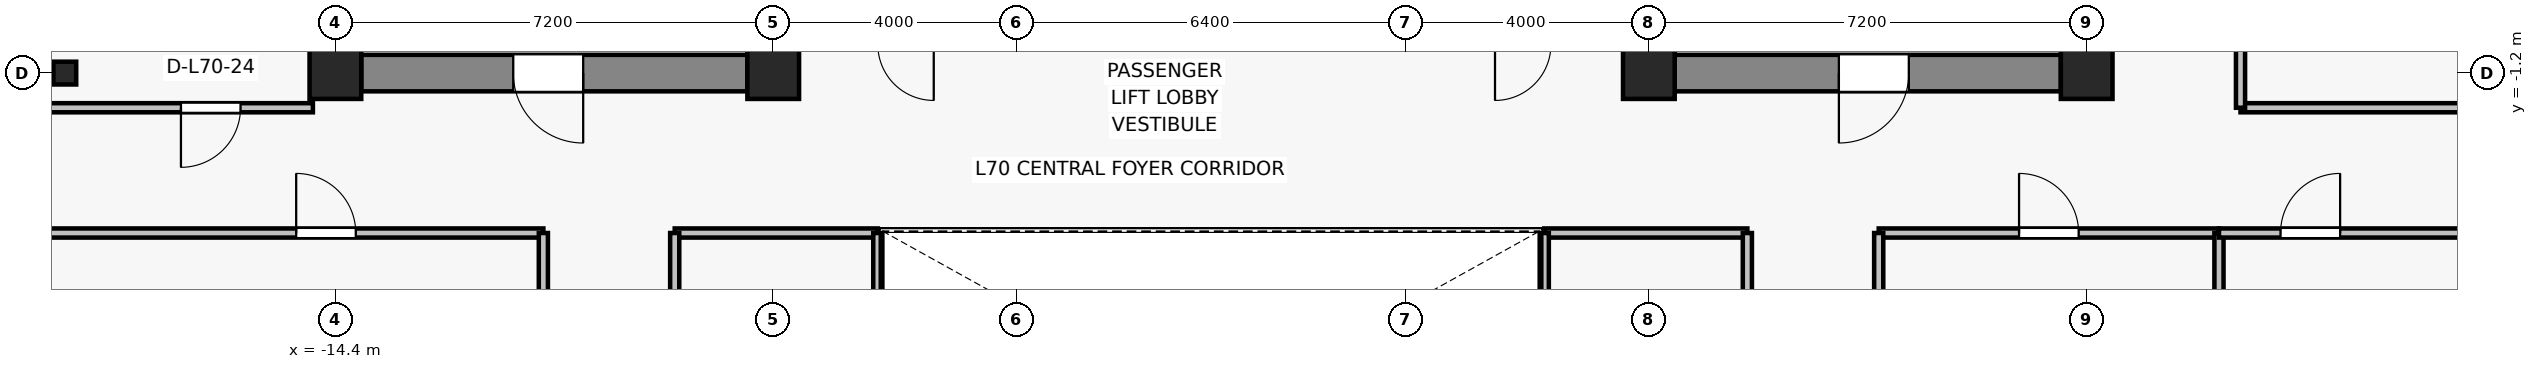
"""IFC4 building model, lengths in metres.
Left out: names, types, materials, properties, quantities, classifications, styles, units other than length and angle.
Written with IfcOpenShell. Run it as: python <this file> out.ifc"""

import sys

from ifc_helpers import new_model, si_unit, direction, frame, frame_2d, origin, origin_2d, place, context, subcontext, project, spatial, rectangle, i_section, extrude, source, transform, mapped, element, fill, save


model = new_model("IFC4")
c1 = context("Model", 3, precision=1e-05, world=origin(), true_north=direction((0.0, 1.0)))
c2 = subcontext(c1, "Body", "Model", "MODEL_VIEW")
j1 = project(units=[si_unit("LENGTHUNIT", "METRE"), si_unit("PLANEANGLEUNIT", "RADIAN")], contexts=[c1])
p1 = place(None, origin())
s1 = spatial("IfcSite", under=j1, at=p1, CompositionType="ELEMENT")
p2 = place(p1, origin())
s2 = spatial("IfcBuilding", under=s1, at=p2, CompositionType="ELEMENT")
p3 = place(p2, frame((0.0, 0.0, 248.5)))
s3 = spatial("IfcBuildingStorey", under=s2, at=p3, CompositionType="ELEMENT", Elevation=248.5)
for number, where, z_axis, x_axis in (
    (1, (-14.4, -1.2, 0.0), (0.0, 0.0, 1.0), (1.0, 0.0, 0.0)),
    (2, (-7.2, -1.2, 0.0), (0.0, 0.0, 1.0), (1.0, 0.0, 0.0)),
    (3, (7.2, -1.2, 0.0), (0.0, 0.0, 1.0), (1.0, 0.0, 0.0)),
    (4, (14.4, -1.2, 0.0), (0.0, 0.0, 1.0), (1.0, 0.0, 0.0)),
):
    element("IfcColumn", number, at=place(p3, frame(where, z_axis=z_axis, x_axis=x_axis)), inside=s3, PredefinedType="COLUMN", context=c2, shape_type="SweptSolid", body=[
        extrude(rectangle(XDim=0.85, YDim=0.85, at=origin_2d()), origin(), (0.0, 0.0, 1.0), 3.3),
    ])
p4 = place(p3, frame((-18.85, -1.2, 0.0), z_axis=(0.0, 0.0, 1.0), x_axis=(1.0, 0.0, 0.0)))
e5 = element("IfcColumn", 5, at=p4, inside=s3, PredefinedType="COLUMN", context=c2, shape_type="SweptSolid", body=[
    extrude(i_section(OverallWidth=0.375, OverallDepth=0.375, WebThickness=0.017, FlangeThickness=0.027, FilletRadius=0.015, at=origin_2d()), origin(), (0.0, 0.0, 1.0), 3.3),
])
p5 = place(p3, frame((-7.625, -1.2, 0.0), z_axis=(0.0, 0.0, 1.0), x_axis=(-1.0, 0.0, 0.0)))
e6 = element("IfcWall", 6, at=p5, inside=s3, PredefinedType="SHEAR", context=c2, shape_type="SweptSolid", body=[
    extrude(rectangle(XDim=6.35, YDim=0.6, at=frame_2d((3.175, 0.0))), origin(), (0.0, 0.0, 1.0), 3.075),
])
p6 = place(p5, frame((2.7, 0.0, 0.0)))
e7 = element("IfcOpeningElement", 7, at=p6, cuts=e6, PredefinedType="OPENING", context=c2, shape_type="SweptSolid", body=[
    extrude(rectangle(XDim=1.15, YDim=2.15, at=frame_2d((0.575, 1.075))), frame((0.0, 0.31, 0.0), z_axis=(0.0, -1.0, 0.0), x_axis=(1.0, 0.0, 0.0)), (0.0, 0.0, 1.0), 0.62),
])
p7 = place(p3, frame((13.975, -1.2, 0.0), z_axis=(0.0, 0.0, 1.0), x_axis=(-1.0, 0.0, 0.0)))
e8 = element("IfcWall", 8, at=p7, inside=s3, PredefinedType="SHEAR", context=c2, shape_type="SweptSolid", body=[
    extrude(rectangle(XDim=6.35, YDim=0.6, at=frame_2d((3.175, 0.0))), origin(), (0.0, 0.0, 1.0), 3.075),
])
p8 = place(p7, frame((2.5, 0.0, 0.0)))
e9 = element("IfcOpeningElement", 9, at=p8, cuts=e8, PredefinedType="OPENING", context=c2, shape_type="SweptSolid", body=[
    extrude(rectangle(XDim=1.15, YDim=2.15, at=frame_2d((0.575, 1.075))), frame((0.0, 0.31, 0.0), z_axis=(0.0, -1.0, 0.0), x_axis=(1.0, 0.0, 0.0)), (0.0, 0.0, 1.0), 0.62),
])
for number, where, z_axis, x_axis in (
    (10, (-7.4, -0.9, 0.0), (0.0, 0.0, 1.0), (0.0, 1.0, 0.0)),
    (11, (7.4, -0.9, 0.0), (0.0, 0.0, 1.0), (0.0, 1.0, 0.0)),
):
    element("IfcWall", number, at=place(p3, frame(where, z_axis=z_axis, x_axis=x_axis)), inside=s3, PredefinedType="SHEAR", context=c2, shape_type="SweptSolid", body=[
        extrude(rectangle(XDim=4.15, YDim=0.45, at=frame_2d((2.075, 0.0))), origin(), (0.0, 0.0, 1.0), 3.075),
    ])
p9 = place(p3, frame((-19.53, -3.83, 0.0), z_axis=(0.0, 0.0, 1.0), x_axis=(1.0, 0.0, 0.0)))
e12 = element("IfcWall", 12, at=p9, inside=s3, PredefinedType="PARTITIONING", context=c2, shape_type="SweptSolid", body=[
    extrude(rectangle(XDim=8.55, YDim=0.15, at=frame_2d((4.275, 0.0))), origin(), (0.0, 0.0, 1.0), 2.615),
])
p10 = place(p9, frame((4.485, 0.0, 0.0)))
e13 = element("IfcOpeningElement", 13, at=p10, cuts=e12, PredefinedType="OPENING", context=c2, shape_type="SweptSolid", body=[
    extrude(rectangle(XDim=0.98, YDim=2.15, at=frame_2d((0.49, 1.075))), frame((0.0, 0.085, 0.0), z_axis=(0.0, -1.0, 0.0), x_axis=(1.0, 0.0, 0.0)), (0.0, 0.0, 1.0), 0.17),
])
p11 = place(p3, frame((-10.98, -3.83, 0.0), z_axis=(0.0, 0.0, 1.0), x_axis=(0.0, -1.0, 0.0)))
e14 = element("IfcWall", 14, at=p11, inside=s3, PredefinedType="PARTITIONING", context=c2, shape_type="SweptSolid", body=[
    extrude(rectangle(XDim=5.69, YDim=0.15, at=frame_2d((2.845, 0.0))), origin(), (0.0, 0.0, 1.0), 2.615),
])
p12 = place(p3, frame((10.98, -3.83, 0.0), z_axis=(0.0, 0.0, 1.0), x_axis=(1.0, 0.0, 0.0)))
e15 = element("IfcWall", 15, at=p12, inside=s3, PredefinedType="PARTITIONING", context=c2, shape_type="SweptSolid", body=[
    extrude(rectangle(XDim=5.596, YDim=0.15, at=frame_2d((2.798, 0.0))), origin(), (0.0, 0.0, 1.0), 2.615),
])
p13 = place(p12, frame((2.308, 0.0, 0.0)))
e16 = element("IfcOpeningElement", 16, at=p13, cuts=e15, PredefinedType="OPENING", context=c2, shape_type="SweptSolid", body=[
    extrude(rectangle(XDim=0.98, YDim=2.15, at=frame_2d((0.49, 1.075))), frame((0.0, 0.085, 0.0), z_axis=(0.0, -1.0, 0.0), x_axis=(1.0, 0.0, 0.0)), (0.0, 0.0, 1.0), 0.17),
])
for number, where, z_axis, x_axis in (
    (17, (10.98, -9.52, 0.0), (0.0, 0.0, 1.0), (0.0, 1.0, 0.0)),
    (18, (16.576, -3.83, 0.0), (0.0, 0.0, 1.0), (0.0, -1.0, 0.0)),
):
    element("IfcWall", number, at=place(p3, frame(where, z_axis=z_axis, x_axis=x_axis)), inside=s3, PredefinedType="PARTITIONING", context=c2, shape_type="SweptSolid", body=[
        extrude(rectangle(XDim=5.69, YDim=0.15, at=frame_2d((2.845, 0.0))), origin(), (0.0, 0.0, 1.0), 2.615),
    ])
p14 = place(p3, frame((16.576, -3.83, 0.0), z_axis=(0.0, 0.0, 1.0), x_axis=(1.0, 0.0, 0.0)))
e19 = element("IfcWall", 19, at=p14, inside=s3, PredefinedType="PARTITIONING", context=c2, shape_type="SweptSolid", body=[
    extrude(rectangle(XDim=6.954, YDim=0.15, at=frame_2d((3.477, 0.0))), origin(), (0.0, 0.0, 1.0), 2.765),
])
p15 = place(p14, frame((1.012, 0.0, 0.0)))
e20 = element("IfcOpeningElement", 20, at=p15, cuts=e19, PredefinedType="OPENING", context=c2, shape_type="SweptSolid", body=[
    extrude(rectangle(XDim=0.98, YDim=2.15, at=frame_2d((0.49, 1.075))), frame((0.0, 0.085, 0.0), z_axis=(0.0, -1.0, 0.0), x_axis=(1.0, 0.0, 0.0)), (0.0, 0.0, 1.0), 0.17),
])
p16 = place(p3, frame((-8.82, -3.83, 0.0), z_axis=(0.0, 0.0, 1.0), x_axis=(1.0, 0.0, 0.0)))
e21 = element("IfcWall", 21, at=p16, inside=s3, PredefinedType="PARTITIONING", context=c2, shape_type="SweptSolid", body=[
    extrude(rectangle(XDim=3.34, YDim=0.15, at=frame_2d((1.67, 0.0))), origin(), (0.0, 0.0, 1.0), 2.615),
])
p17 = place(p3, frame((-8.82, -9.52, 0.0), z_axis=(0.0, 0.0, 1.0), x_axis=(0.0, 1.0, 0.0)))
e22 = element("IfcWall", 22, at=p17, inside=s3, PredefinedType="PARTITIONING", context=c2, shape_type="SweptSolid", body=[
    extrude(rectangle(XDim=5.69, YDim=0.15, at=frame_2d((2.845, 0.0))), origin(), (0.0, 0.0, 1.0), 2.615),
])
p18 = place(p17, frame((2.355, 0.0, 0.0)))
e23 = element("IfcOpeningElement", 23, at=p18, cuts=e22, PredefinedType="OPENING", context=c2, shape_type="SweptSolid", body=[
    extrude(rectangle(XDim=0.98, YDim=2.15, at=frame_2d((0.49, 1.075))), frame((0.0, 0.085, 0.0), z_axis=(0.0, -1.0, 0.0), x_axis=(1.0, 0.0, 0.0)), (0.0, 0.0, 1.0), 0.17),
])
p19 = place(p3, frame((-5.48, -3.83, 0.0), z_axis=(0.0, 0.0, 1.0), x_axis=(0.0, -1.0, 0.0)))
e24 = element("IfcWall", 24, at=p19, inside=s3, PredefinedType="PARTITIONING", context=c2, shape_type="SweptSolid", body=[
    extrude(rectangle(XDim=5.69, YDim=0.15, at=frame_2d((2.845, 0.0))), origin(), (0.0, 0.0, 1.0), 2.615),
])
p20 = place(p3, frame((5.48, -3.83, 0.0), z_axis=(0.0, 0.0, 1.0), x_axis=(1.0, 0.0, 0.0)))
e25 = element("IfcWall", 25, at=p20, inside=s3, PredefinedType="PARTITIONING", context=c2, shape_type="SweptSolid", body=[
    extrude(rectangle(XDim=3.34, YDim=0.15, at=frame_2d((1.67, 0.0))), origin(), (0.0, 0.0, 1.0), 2.615),
])
p21 = place(p3, frame((5.48, -9.52, 0.0), z_axis=(0.0, 0.0, 1.0), x_axis=(0.0, 1.0, 0.0)))
e26 = element("IfcWall", 26, at=p21, inside=s3, PredefinedType="PARTITIONING", context=c2, shape_type="SweptSolid", body=[
    extrude(rectangle(XDim=5.69, YDim=0.15, at=frame_2d((2.845, 0.0))), origin(), (0.0, 0.0, 1.0), 2.615),
])
p22 = place(p3, frame((8.82, -3.83, 0.0), z_axis=(0.0, 0.0, 1.0), x_axis=(0.0, -1.0, 0.0)))
e27 = element("IfcWall", 27, at=p22, inside=s3, PredefinedType="PARTITIONING", context=c2, shape_type="SweptSolid", body=[
    extrude(rectangle(XDim=5.69, YDim=0.15, at=frame_2d((2.845, 0.0))), origin(), (0.0, 0.0, 1.0), 2.615),
])
p23 = place(p22, frame((2.355, 0.0, 0.0)))
e28 = element("IfcOpeningElement", 28, at=p23, cuts=e27, PredefinedType="OPENING", context=c2, shape_type="SweptSolid", body=[
    extrude(rectangle(XDim=0.98, YDim=2.15, at=frame_2d((0.49, 1.075))), frame((0.0, 0.085, 0.0), z_axis=(0.0, -1.0, 0.0), x_axis=(1.0, 0.0, 0.0)), (0.0, 0.0, 1.0), 0.17),
])
p24 = place(p3, frame((-14.77, -1.77, 0.0), z_axis=(0.0, 0.0, 1.0), x_axis=(-1.0, 0.0, 0.0)))
e29 = element("IfcWall", 29, at=p24, inside=s3, PredefinedType="PARTITIONING", context=c2, shape_type="SweptSolid", body=[
    extrude(rectangle(XDim=4.76, YDim=0.15, at=frame_2d((2.38, 0.0))), origin(), (0.0, 0.0, 1.0), 2.765),
])
p25 = place(p24, frame((1.19, 0.0, 0.0)))
e30 = element("IfcOpeningElement", 30, at=p25, cuts=e29, PredefinedType="OPENING", context=c2, shape_type="SweptSolid", body=[
    extrude(rectangle(XDim=0.98, YDim=2.15, at=frame_2d((0.49, 1.075))), frame((0.0, 0.085, 0.0), z_axis=(0.0, -1.0, 0.0), x_axis=(1.0, 0.0, 0.0)), (0.0, 0.0, 1.0), 0.17),
])
p26 = place(p3, frame((23.53, -1.77, 0.0), z_axis=(0.0, 0.0, 1.0), x_axis=(-1.0, 0.0, 0.0)))
e31 = element("IfcWall", 31, at=p26, inside=s3, PredefinedType="PARTITIONING", context=c2, shape_type="SweptSolid", body=[
    extrude(rectangle(XDim=6.6, YDim=0.15, at=frame_2d((3.3, 0.0))), origin(), (0.0, 0.0, 1.0), 2.765),
])
p27 = place(p3, frame((16.93, -1.77, 0.0), z_axis=(0.0, 0.0, 1.0), x_axis=(0.0, 1.0, 0.0)))
e32 = element("IfcWall", 32, at=p27, inside=s3, PredefinedType="PARTITIONING", context=c2, shape_type="SweptSolid", body=[
    extrude(rectangle(XDim=15.65, YDim=0.15, at=frame_2d((7.825, 0.0))), origin(), (0.0, 0.0, 1.0), 2.615),
])
p28 = place(p27, frame((7.335, 0.0, 0.0)))
e33 = element("IfcOpeningElement", 33, at=p28, cuts=e32, PredefinedType="OPENING", context=c2, shape_type="SweptSolid", body=[
    extrude(rectangle(XDim=0.98, YDim=2.15, at=frame_2d((0.49, 1.075))), frame((0.0, 0.085, 0.0), z_axis=(0.0, -1.0, 0.0), x_axis=(1.0, 0.0, 0.0)), (0.0, 0.0, 1.0), 0.17),
])
m1 = source(origin(), c2, "Body", "SweptSolid", [
    extrude(rectangle(XDim=1.15, YDim=2.15, at=frame_2d((0.575, 1.075))), frame((0.0, 0.025, 0.0), z_axis=(0.0, -1.0, 0.0), x_axis=(1.0, 0.0, 0.0)), (0.0, 0.0, 1.0), 0.05),
])
p29 = place(p6, origin())
e34 = element("IfcDoor", 34, at=p29, inside=s3, OperationType="SINGLE_SWING_LEFT", PredefinedType="DOOR", context=c2, shape_type="MappedRepresentation", body=[
    mapped(m1, transform((0.0, 0.0, 0.0), x_axis=(1.0, 0.0, 0.0), y_axis=(0.0, 1.0, 0.0), z_axis=(0.0, 0.0, 1.0), scale=1.0)),
])
fill(e7, e34)
p30 = place(p8, origin())
e35 = element("IfcDoor", 35, at=p30, inside=s3, OperationType="SINGLE_SWING_RIGHT", PredefinedType="DOOR", context=c2, shape_type="MappedRepresentation", body=[
    mapped(m1, transform((0.0, 0.0, 0.0), x_axis=(1.0, 0.0, 0.0), y_axis=(0.0, 1.0, 0.0), z_axis=(0.0, 0.0, 1.0), scale=1.0)),
])
fill(e9, e35)
m2 = source(origin(), c2, "Body", "SweptSolid", [
    extrude(rectangle(XDim=0.98, YDim=2.15, at=frame_2d((0.49, 1.075))), frame((0.0, 0.025, 0.0), z_axis=(0.0, -1.0, 0.0), x_axis=(1.0, 0.0, 0.0)), (0.0, 0.0, 1.0), 0.05),
])
p31 = place(p10, origin())
e36 = element("IfcDoor", 36, at=p31, inside=s3, OperationType="SINGLE_SWING_LEFT", PredefinedType="DOOR", context=c2, shape_type="MappedRepresentation", body=[
    mapped(m2, transform((0.0, 0.0, 0.0), x_axis=(1.0, 0.0, 0.0), y_axis=(0.0, 1.0, 0.0), z_axis=(0.0, 0.0, 1.0), scale=1.0)),
])
fill(e13, e36)
p32 = place(p13, origin())
e37 = element("IfcDoor", 37, at=p32, inside=s3, OperationType="SINGLE_SWING_LEFT", PredefinedType="DOOR", context=c2, shape_type="MappedRepresentation", body=[
    mapped(m2, transform((0.0, 0.0, 0.0), x_axis=(1.0, 0.0, 0.0), y_axis=(0.0, 1.0, 0.0), z_axis=(0.0, 0.0, 1.0), scale=1.0)),
])
fill(e16, e37)
p33 = place(p15, origin())
e38 = element("IfcDoor", 38, at=p33, inside=s3, OperationType="SINGLE_SWING_RIGHT", PredefinedType="DOOR", context=c2, shape_type="MappedRepresentation", body=[
    mapped(m2, transform((0.0, 0.0, 0.0), x_axis=(1.0, 0.0, 0.0), y_axis=(0.0, 1.0, 0.0), z_axis=(0.0, 0.0, 1.0), scale=1.0)),
])
fill(e20, e38)
p34 = place(p25, origin())
e39 = element("IfcDoor", 39, at=p34, inside=s3, OperationType="SINGLE_SWING_RIGHT", PredefinedType="DOOR", context=c2, shape_type="MappedRepresentation", body=[
    mapped(m2, transform((0.0, 0.0, 0.0), x_axis=(1.0, 0.0, 0.0), y_axis=(0.0, 1.0, 0.0), z_axis=(0.0, 0.0, 1.0), scale=1.0)),
])
fill(e30, e39)
save(model, sys.argv[1])
